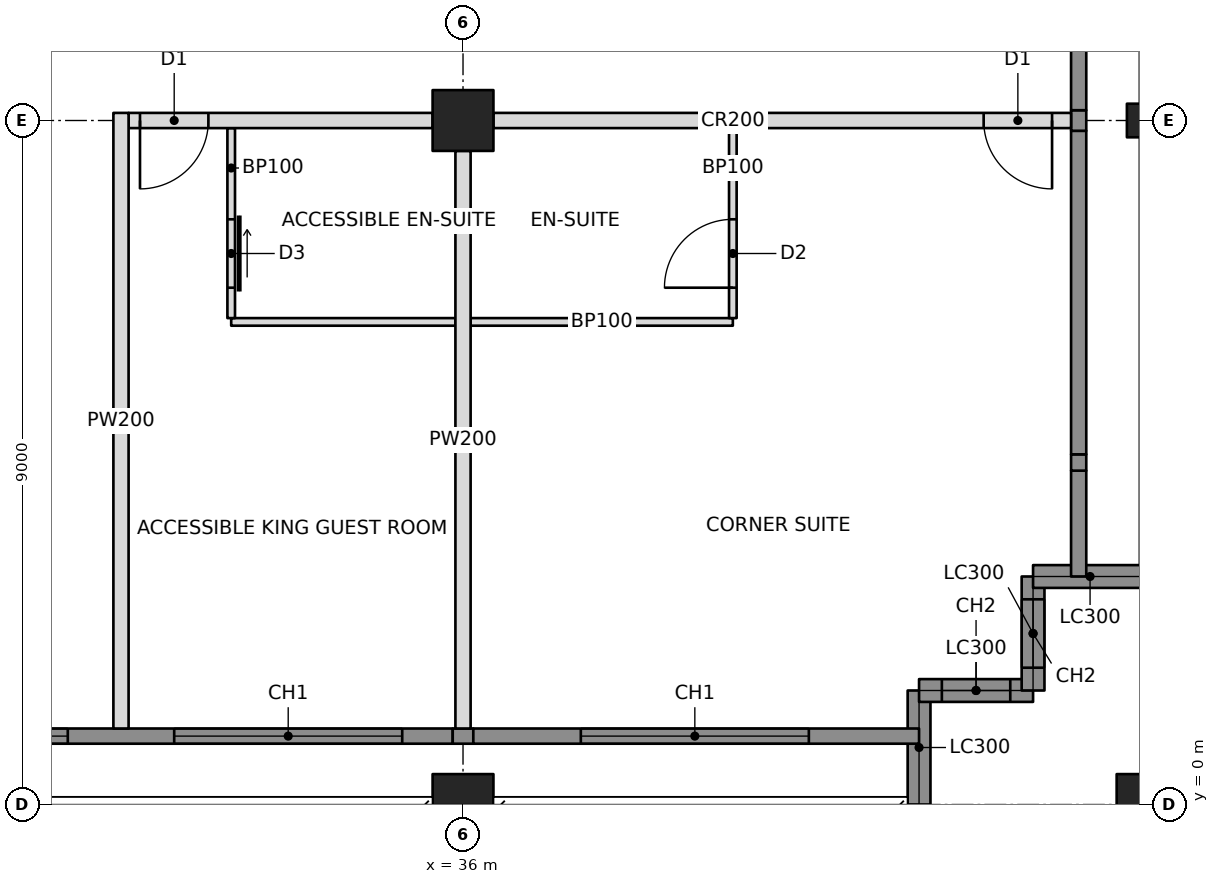
"""IFC4 building model, lengths in metres.
Left out: names, types, materials, properties, quantities, classifications, styles, units other than length and angle.
Written with IfcOpenShell. Run it as: python <this file> out.ifc"""

import sys

from ifc_helpers import new_model, si_unit, direction, frame, frame_2d, origin, origin_2d, place, context, subcontext, project, spatial, rectangle, hollow_rectangle, i_section, extrude, element, fill, save


model = new_model("IFC4")
c1 = context("Model", 3, precision=1e-05, world=origin(), true_north=direction((0.0, 1.0)))
c2 = subcontext(c1, "Body", "Model", "MODEL_VIEW")
j1 = project(units=[si_unit("LENGTHUNIT", "METRE"), si_unit("PLANEANGLEUNIT", "RADIAN")], contexts=[c1])
p1 = place(None, origin())
s1 = spatial("IfcSite", under=j1, at=p1, CompositionType="ELEMENT")
p2 = place(p1, origin())
s2 = spatial("IfcBuilding", under=s1, at=p2, CompositionType="ELEMENT")
p3 = place(p2, frame((0.0, 0.0, 124.8)))
s3 = spatial("IfcBuildingStorey", under=s2, at=p3, CompositionType="ELEMENT", Elevation=124.8)
p4 = place(p3, frame((36.0, 0.0, 0.0), z_axis=(0.0, 0.0, 1.0), x_axis=(1.0, 0.0, 0.0)))
e1 = element("IfcColumn", 1, at=p4, inside=s3, PredefinedType="COLUMN", context=c2, shape_type="SweptSolid", body=[
    extrude(hollow_rectangle(XDim=0.8, YDim=0.8, WallThickness=0.06, at=origin_2d()), origin(), (0.0, 0.0, 1.0), 3.4),
])
p5 = place(p3, frame((36.0, 9.0, 0.0), z_axis=(0.0, 0.0, 1.0), x_axis=(0.0, 1.0, 0.0)))
e2 = element("IfcColumn", 2, at=p5, inside=s3, PredefinedType="COLUMN", context=c2, shape_type="SweptSolid", body=[
    extrude(hollow_rectangle(XDim=0.8, YDim=0.8, WallThickness=0.07, at=origin_2d()), origin(), (0.0, 0.0, 1.0), 3.4),
])
p6 = place(p3, frame((45.0, 0.0, 0.0), z_axis=(0.0, 0.0, 1.0), x_axis=(1.0, 0.0, 0.0)))
e3 = element("IfcColumn", 3, at=p6, inside=s3, PredefinedType="COLUMN", context=c2, shape_type="SweptSolid", body=[
    extrude(hollow_rectangle(XDim=0.8, YDim=0.8, WallThickness=0.06, at=origin_2d()), origin(), (0.0, 0.0, 1.0), 3.4),
])
p7 = place(p3, frame((45.0, 9.0, 0.0), z_axis=(0.0, 0.0, 1.0), x_axis=(0.0, 1.0, 0.0)))
e4 = element("IfcColumn", 4, at=p7, inside=s3, PredefinedType="COLUMN", context=c2, shape_type="SweptSolid", body=[
    extrude(i_section(OverallWidth=0.442, OverallDepth=0.531, WebThickness=0.066, FlangeThickness=0.106, at=origin_2d()), origin(), (0.0, 0.0, 1.0), 3.4),
])
p8 = place(p3, frame((42.0, 0.0, 0.0), z_axis=(0.0, 0.0, 1.0), x_axis=(0.0, 1.0, 0.0)))
e5 = element("IfcWall", 5, at=p8, inside=s3, PredefinedType="SOLIDWALL", context=c2, shape_type="SweptSolid", body=[
    extrude(rectangle(XDim=1.5, YDim=0.3, at=frame_2d((0.75, 0.0))), origin(), (0.0, 0.0, 1.0), 2.42),
])
p9 = place(p3, frame((42.0, 1.5, 0.0), z_axis=(0.0, 0.0, 1.0), x_axis=(1.0, 0.0, 0.0)))
e6 = element("IfcWall", 6, at=p9, inside=s3, PredefinedType="SOLIDWALL", context=c2, shape_type="SweptSolid", body=[
    extrude(rectangle(XDim=1.5, YDim=0.3, at=frame_2d((0.75, 0.0))), origin(), (0.0, 0.0, 1.0), 3.2),
])
p10 = place(p9, frame((0.3, 0.0, 0.6)))
e7 = element("IfcOpeningElement", 7, at=p10, cuts=e6, PredefinedType="OPENING", context=c2, shape_type="SweptSolid", body=[
    extrude(rectangle(XDim=0.9, YDim=2.2, at=frame_2d((0.45, 1.1))), frame((0.0, 0.16, 0.0), z_axis=(0.0, -1.0, 0.0), x_axis=(1.0, 0.0, 0.0)), (0.0, 0.0, 1.0), 0.32),
])
p11 = place(p3, frame((43.5, 1.5, 0.0), z_axis=(0.0, 0.0, 1.0), x_axis=(0.0, 1.0, 0.0)))
e8 = element("IfcWall", 8, at=p11, inside=s3, PredefinedType="SOLIDWALL", context=c2, shape_type="SweptSolid", body=[
    extrude(rectangle(XDim=1.5, YDim=0.3, at=frame_2d((0.75, 0.0))), origin(), (0.0, 0.0, 1.0), 3.2),
])
p12 = place(p11, frame((0.3, 0.0, 0.6)))
e9 = element("IfcOpeningElement", 9, at=p12, cuts=e8, PredefinedType="OPENING", context=c2, shape_type="SweptSolid", body=[
    extrude(rectangle(XDim=0.9, YDim=2.2, at=frame_2d((0.45, 1.1))), frame((0.0, 0.16, 0.0), z_axis=(0.0, -1.0, 0.0), x_axis=(1.0, 0.0, 0.0)), (0.0, 0.0, 1.0), 0.32),
])
p13 = place(p3, frame((43.5, 3.0, 0.0), z_axis=(0.0, 0.0, 1.0), x_axis=(1.0, 0.0, 0.0)))
e10 = element("IfcWall", 10, at=p13, inside=s3, PredefinedType="SOLIDWALL", context=c2, shape_type="SweptSolid", body=[
    extrude(rectangle(XDim=1.5, YDim=0.3, at=frame_2d((0.75, 0.0))), origin(), (0.0, 0.0, 1.0), 2.42),
])
p14 = place(p3, frame((44.1, 3.0, 0.0), z_axis=(0.0, 0.0, 1.0), x_axis=(0.0, 1.0, 0.0)))
e11 = element("IfcWall", 11, at=p14, inside=s3, PredefinedType="SOLIDWALL", context=c2, shape_type="SweptSolid", body=[
    extrude(rectangle(XDim=1.393, YDim=0.2, at=frame_2d((0.696, 0.0))), origin(), (0.0, 0.0, 1.0), 3.2),
])
p15 = place(p3, frame((31.6, 9.0, 0.0), z_axis=(0.0, 0.0, 1.0), x_axis=(1.0, 0.0, 0.0)))
e12 = element("IfcWall", 12, at=p15, inside=s3, PredefinedType="PARTITIONING", context=c2, shape_type="SweptSolid", body=[
    extrude(rectangle(XDim=4.0, YDim=0.2, at=frame_2d((2.0, 0.0))), origin(), (0.0, 0.0, 1.0), 2.405),
])
p16 = place(p15, frame((0.15, 0.0, 0.0)))
e13 = element("IfcOpeningElement", 13, at=p16, cuts=e12, PredefinedType="OPENING", context=c2, shape_type="SweptSolid", body=[
    extrude(rectangle(XDim=0.9, YDim=2.1, at=frame_2d((0.45, 1.05))), frame((0.0, 0.11, 0.0), z_axis=(0.0, -1.0, 0.0), x_axis=(1.0, 0.0, 0.0)), (0.0, 0.0, 1.0), 0.22),
])
p17 = place(p3, frame((36.4, 9.0, 0.0), z_axis=(0.0, 0.0, 1.0), x_axis=(1.0, 0.0, 0.0)))
e14 = element("IfcWall", 14, at=p17, inside=s3, PredefinedType="PARTITIONING", context=c2, shape_type="SweptSolid", body=[
    extrude(rectangle(XDim=7.6, YDim=0.2, at=frame_2d((3.8, 0.0))), origin(), (0.0, 0.0, 1.0), 2.438),
])
p18 = place(p17, frame((6.45, 0.0, 0.0)))
e15 = element("IfcOpeningElement", 15, at=p18, cuts=e14, PredefinedType="OPENING", context=c2, shape_type="SweptSolid", body=[
    extrude(rectangle(XDim=0.9, YDim=2.1, at=frame_2d((0.45, 1.05))), frame((0.0, 0.11, 0.0), z_axis=(0.0, -1.0, 0.0), x_axis=(1.0, 0.0, 0.0)), (0.0, 0.0, 1.0), 0.22),
])
p19 = place(p3, frame((31.5, 9.1, 0.0), z_axis=(0.0, 0.0, 1.0), x_axis=(0.0, -1.0, 0.0)))
e16 = element("IfcWall", 16, at=p19, inside=s3, PredefinedType="PARTITIONING", context=c2, shape_type="SweptSolid", body=[
    extrude(rectangle(XDim=8.1, YDim=0.2, at=frame_2d((4.05, 0.0))), origin(), (0.0, 0.0, 1.0), 2.404),
])
p20 = place(p3, frame((36.0, 8.6, 0.0), z_axis=(0.0, 0.0, 1.0), x_axis=(0.0, -1.0, 0.0)))
e17 = element("IfcWall", 17, at=p20, inside=s3, PredefinedType="PARTITIONING", context=c2, shape_type="SweptSolid", body=[
    extrude(rectangle(XDim=7.6, YDim=0.2, at=frame_2d((3.8, 0.0))), origin(), (0.0, 0.0, 1.0), 2.438),
])
p21 = place(p3, frame((32.95, 6.35, 0.0), z_axis=(0.0, 0.0, 1.0), x_axis=(1.0, 0.0, 0.0)))
e18 = element("IfcWall", 18, at=p21, inside=s3, PredefinedType="PARTITIONING", context=c2, shape_type="SweptSolid", body=[
    extrude(rectangle(XDim=2.95, YDim=0.1, at=frame_2d((1.475, 0.0))), origin(), (0.0, 0.0, 1.0), 2.438),
])
p22 = place(p3, frame((32.95, 8.9, 0.0), z_axis=(0.0, 0.0, 1.0), x_axis=(0.0, -1.0, 0.0)))
e19 = element("IfcWall", 19, at=p22, inside=s3, PredefinedType="PARTITIONING", context=c2, shape_type="SweptSolid", body=[
    extrude(rectangle(XDim=2.5, YDim=0.1, at=frame_2d((1.25, 0.0))), origin(), (0.0, 0.0, 1.0), 2.404),
])
p23 = place(p22, frame((1.2, 0.0, 0.0)))
e20 = element("IfcOpeningElement", 20, at=p23, cuts=e19, PredefinedType="OPENING", context=c2, shape_type="SweptSolid", body=[
    extrude(rectangle(XDim=0.9, YDim=2.1, at=frame_2d((0.45, 1.05))), frame((0.0, 0.06, 0.0), z_axis=(0.0, -1.0, 0.0), x_axis=(1.0, 0.0, 0.0)), (0.0, 0.0, 1.0), 0.12),
])
p24 = place(p3, frame((36.1, 6.35, 0.0), z_axis=(0.0, 0.0, 1.0), x_axis=(1.0, 0.0, 0.0)))
e21 = element("IfcWall", 21, at=p24, inside=s3, PredefinedType="PARTITIONING", context=c2, shape_type="SweptSolid", body=[
    extrude(rectangle(XDim=3.45, YDim=0.1, at=frame_2d((1.725, 0.0))), origin(), (0.0, 0.0, 1.0), 2.438),
])
p25 = place(p3, frame((39.55, 8.9, 0.0), z_axis=(0.0, 0.0, 1.0), x_axis=(0.0, -1.0, 0.0)))
e22 = element("IfcWall", 22, at=p25, inside=s3, PredefinedType="PARTITIONING", context=c2, shape_type="SweptSolid", body=[
    extrude(rectangle(XDim=2.5, YDim=0.1, at=frame_2d((1.25, 0.0))), origin(), (0.0, 0.0, 1.0), 2.438),
])
p26 = place(p25, frame((1.2, 0.0, 0.0)))
e23 = element("IfcOpeningElement", 23, at=p26, cuts=e22, PredefinedType="OPENING", context=c2, shape_type="SweptSolid", body=[
    extrude(rectangle(XDim=0.9, YDim=2.1, at=frame_2d((0.45, 1.05))), frame((0.0, 0.06, 0.0), z_axis=(0.0, -1.0, 0.0), x_axis=(1.0, 0.0, 0.0)), (0.0, 0.0, 1.0), 0.12),
])
p27 = place(p3, frame((27.194, 0.9, 0.0), z_axis=(0.0, 0.0, 1.0), x_axis=(1.0, 0.0, 0.0)))
e24 = element("IfcWall", 24, at=p27, inside=s3, PredefinedType="SOLIDWALL", context=c2, shape_type="SweptSolid", body=[
    extrude(rectangle(XDim=8.671, YDim=0.2, at=frame_2d((4.335, 0.0))), origin(), (0.0, 0.0, 1.0), 3.2),
])
p28 = place(p27, frame((0.606, 0.0, 0.6)))
e25 = element("IfcOpeningElement", 25, at=p28, cuts=e24, PredefinedType="OPENING", context=c2, shape_type="SweptSolid", body=[
    extrude(rectangle(XDim=3.0, YDim=2.2, at=frame_2d((1.5, 1.1))), frame((0.0, 0.11, 0.0), z_axis=(0.0, -1.0, 0.0), x_axis=(1.0, 0.0, 0.0)), (0.0, 0.0, 1.0), 0.22),
])
p29 = place(p27, frame((5.006, 0.0, 0.6)))
e26 = element("IfcOpeningElement", 26, at=p29, cuts=e24, PredefinedType="OPENING", context=c2, shape_type="SweptSolid", body=[
    extrude(rectangle(XDim=3.0, YDim=2.2, at=frame_2d((1.5, 1.1))), frame((0.0, 0.11, 0.0), z_axis=(0.0, -1.0, 0.0), x_axis=(1.0, 0.0, 0.0)), (0.0, 0.0, 1.0), 0.22),
])
p30 = place(p3, frame((35.865, 0.9, 0.0), z_axis=(0.0, 0.0, 1.0), x_axis=(1.0, 0.0, 0.0)))
e27 = element("IfcWall", 27, at=p30, inside=s3, PredefinedType="SOLIDWALL", context=c2, shape_type="SweptSolid", body=[
    extrude(rectangle(XDim=0.271, YDim=0.2, at=frame_2d((0.135, 0.0))), origin(), (0.0, 0.0, 1.0), 2.438),
])
p31 = place(p3, frame((36.135, 0.9, 0.0), z_axis=(0.0, 0.0, 1.0), x_axis=(1.0, 0.0, 0.0)))
e28 = element("IfcWall", 28, at=p31, inside=s3, PredefinedType="SOLIDWALL", context=c2, shape_type="SweptSolid", body=[
    extrude(rectangle(XDim=5.865, YDim=0.2, at=frame_2d((2.932, 0.0))), origin(), (0.0, 0.0, 1.0), 3.2),
])
p32 = place(p31, frame((1.415, 0.0, 0.6)))
e29 = element("IfcOpeningElement", 29, at=p32, cuts=e28, PredefinedType="OPENING", context=c2, shape_type="SweptSolid", body=[
    extrude(rectangle(XDim=3.0, YDim=2.2, at=frame_2d((1.5, 1.1))), frame((0.0, 0.11, 0.0), z_axis=(0.0, -1.0, 0.0), x_axis=(1.0, 0.0, 0.0)), (0.0, 0.0, 1.0), 0.22),
])
p33 = place(p3, frame((44.1, 4.393, 0.0), z_axis=(0.0, 0.0, 1.0), x_axis=(0.0, 1.0, 0.0)))
e30 = element("IfcWall", 30, at=p33, inside=s3, PredefinedType="SOLIDWALL", context=c2, shape_type="SweptSolid", body=[
    extrude(rectangle(XDim=0.215, YDim=0.2, at=frame_2d((0.107, 0.0))), origin(), (0.0, 0.0, 1.0), 2.661),
])
p34 = place(p3, frame((44.1, 4.607, 0.0), z_axis=(0.0, 0.0, 1.0), x_axis=(0.0, 1.0, 0.0)))
e31 = element("IfcWall", 31, at=p34, inside=s3, PredefinedType="SOLIDWALL", context=c2, shape_type="SweptSolid", body=[
    extrude(rectangle(XDim=4.257, YDim=0.2, at=frame_2d((2.129, 0.0))), origin(), (0.0, 0.0, 1.0), 3.2),
])
p35 = place(p3, frame((44.1, 8.865, 0.0), z_axis=(0.0, 0.0, 1.0), x_axis=(0.0, 1.0, 0.0)))
e32 = element("IfcWall", 32, at=p35, inside=s3, PredefinedType="SOLIDWALL", context=c2, shape_type="SweptSolid", body=[
    extrude(rectangle(XDim=0.271, YDim=0.2, at=frame_2d((0.135, 0.0))), origin(), (0.0, 0.0, 1.0), 2.438),
])
p36 = place(p3, frame((44.1, 9.135, 0.0), z_axis=(0.0, 0.0, 1.0), x_axis=(0.0, 1.0, 0.0)))
e33 = element("IfcWall", 33, at=p36, inside=s3, PredefinedType="SOLIDWALL", context=c2, shape_type="SweptSolid", body=[
    extrude(rectangle(XDim=8.671, YDim=0.2, at=frame_2d((4.335, 0.0))), origin(), (0.0, 0.0, 1.0), 3.2),
])
p37 = place(p36, frame((2.015, 0.0, 0.6)))
e34 = element("IfcOpeningElement", 34, at=p37, cuts=e33, PredefinedType="OPENING", context=c2, shape_type="SweptSolid", body=[
    extrude(rectangle(XDim=3.0, YDim=2.2, at=frame_2d((1.5, 1.1))), frame((0.0, 0.11, 0.0), z_axis=(0.0, -1.0, 0.0), x_axis=(1.0, 0.0, 0.0)), (0.0, 0.0, 1.0), 0.22),
])
p38 = place(p36, frame((5.515, 0.0, 0.6)))
e35 = element("IfcOpeningElement", 35, at=p38, cuts=e33, PredefinedType="OPENING", context=c2, shape_type="SweptSolid", body=[
    extrude(rectangle(XDim=3.0, YDim=2.2, at=frame_2d((1.5, 1.1))), frame((0.0, 0.11, 0.0), z_axis=(0.0, -1.0, 0.0), x_axis=(1.0, 0.0, 0.0)), (0.0, 0.0, 1.0), 0.22),
])
p39 = place(p10, origin())
e36 = element("IfcWindow", 36, at=p39, inside=s3, PartitioningType="SINGLE_PANEL", PredefinedType="WINDOW", context=c2, shape_type="SweptSolid", body=[
    extrude(rectangle(XDim=0.9, YDim=2.2, at=frame_2d((0.45, 1.1))), frame((0.0, 0.03, 0.0), z_axis=(0.0, -1.0, 0.0), x_axis=(1.0, 0.0, 0.0)), (0.0, 0.0, 1.0), 0.06),
])
fill(e7, e36)
p40 = place(p12, origin())
e37 = element("IfcWindow", 37, at=p40, inside=s3, PartitioningType="SINGLE_PANEL", PredefinedType="WINDOW", context=c2, shape_type="SweptSolid", body=[
    extrude(rectangle(XDim=0.9, YDim=2.2, at=frame_2d((0.45, 1.1))), frame((0.0, 0.03, 0.0), z_axis=(0.0, -1.0, 0.0), x_axis=(1.0, 0.0, 0.0)), (0.0, 0.0, 1.0), 0.06),
])
fill(e9, e37)
p41 = place(p28, origin())
e38 = element("IfcWindow", 38, at=p41, inside=s3, PartitioningType="TRIPLE_PANEL_VERTICAL", PredefinedType="WINDOW", context=c2, shape_type="SweptSolid", body=[
    extrude(rectangle(XDim=3.0, YDim=2.2, at=frame_2d((1.5, 1.1))), frame((0.0, 0.03, 0.0), z_axis=(0.0, -1.0, 0.0), x_axis=(1.0, 0.0, 0.0)), (0.0, 0.0, 1.0), 0.06),
])
fill(e25, e38)
p42 = place(p29, origin())
e39 = element("IfcWindow", 39, at=p42, inside=s3, PartitioningType="TRIPLE_PANEL_VERTICAL", PredefinedType="WINDOW", context=c2, shape_type="SweptSolid", body=[
    extrude(rectangle(XDim=3.0, YDim=2.2, at=frame_2d((1.5, 1.1))), frame((0.0, 0.03, 0.0), z_axis=(0.0, -1.0, 0.0), x_axis=(1.0, 0.0, 0.0)), (0.0, 0.0, 1.0), 0.06),
])
fill(e26, e39)
p43 = place(p32, origin())
e40 = element("IfcWindow", 40, at=p43, inside=s3, PartitioningType="TRIPLE_PANEL_VERTICAL", PredefinedType="WINDOW", context=c2, shape_type="SweptSolid", body=[
    extrude(rectangle(XDim=3.0, YDim=2.2, at=frame_2d((1.5, 1.1))), frame((0.0, 0.03, 0.0), z_axis=(0.0, -1.0, 0.0), x_axis=(1.0, 0.0, 0.0)), (0.0, 0.0, 1.0), 0.06),
])
fill(e29, e40)
p44 = place(p23, origin())
e41 = element("IfcDoor", 41, at=p44, inside=s3, OperationType="SLIDING_TO_LEFT", PredefinedType="DOOR", context=c2, shape_type="SweptSolid", body=[
    extrude(rectangle(XDim=0.9, YDim=2.1, at=frame_2d((0.45, 1.05))), frame((0.0, 0.025, 0.0), z_axis=(0.0, -1.0, 0.0), x_axis=(1.0, 0.0, 0.0)), (0.0, 0.0, 1.0), 0.05),
])
fill(e20, e41)
p45 = place(p16, frame((0.9, 0.0, 0.0), z_axis=(0.0, 0.0, 1.0), x_axis=(-1.0, 0.0, 0.0)))
e42 = element("IfcDoor", 42, at=p45, inside=s3, OperationType="SINGLE_SWING_RIGHT", PredefinedType="DOOR", context=c2, shape_type="SweptSolid", body=[
    extrude(rectangle(XDim=0.9, YDim=2.1, at=frame_2d((0.45, 1.05))), frame((0.0, 0.025, 0.0), z_axis=(0.0, -1.0, 0.0), x_axis=(1.0, 0.0, 0.0)), (0.0, 0.0, 1.0), 0.05),
])
fill(e13, e42)
p46 = place(p26, frame((0.9, 0.0, 0.0), z_axis=(0.0, 0.0, 1.0), x_axis=(-1.0, 0.0, 0.0)))
e43 = element("IfcDoor", 43, at=p46, inside=s3, OperationType="SINGLE_SWING_LEFT", PredefinedType="DOOR", context=c2, shape_type="SweptSolid", body=[
    extrude(rectangle(XDim=0.9, YDim=2.1, at=frame_2d((0.45, 1.05))), frame((0.0, 0.025, 0.0), z_axis=(0.0, -1.0, 0.0), x_axis=(1.0, 0.0, 0.0)), (0.0, 0.0, 1.0), 0.05),
])
fill(e23, e43)
p47 = place(p18, frame((0.9, 0.0, 0.0), z_axis=(0.0, 0.0, 1.0), x_axis=(-1.0, 0.0, 0.0)))
e44 = element("IfcDoor", 44, at=p47, inside=s3, OperationType="SINGLE_SWING_LEFT", PredefinedType="DOOR", context=c2, shape_type="SweptSolid", body=[
    extrude(rectangle(XDim=0.9, YDim=2.1, at=frame_2d((0.45, 1.05))), frame((0.0, 0.025, 0.0), z_axis=(0.0, -1.0, 0.0), x_axis=(1.0, 0.0, 0.0)), (0.0, 0.0, 1.0), 0.05),
])
fill(e15, e44)
save(model, sys.argv[1])
